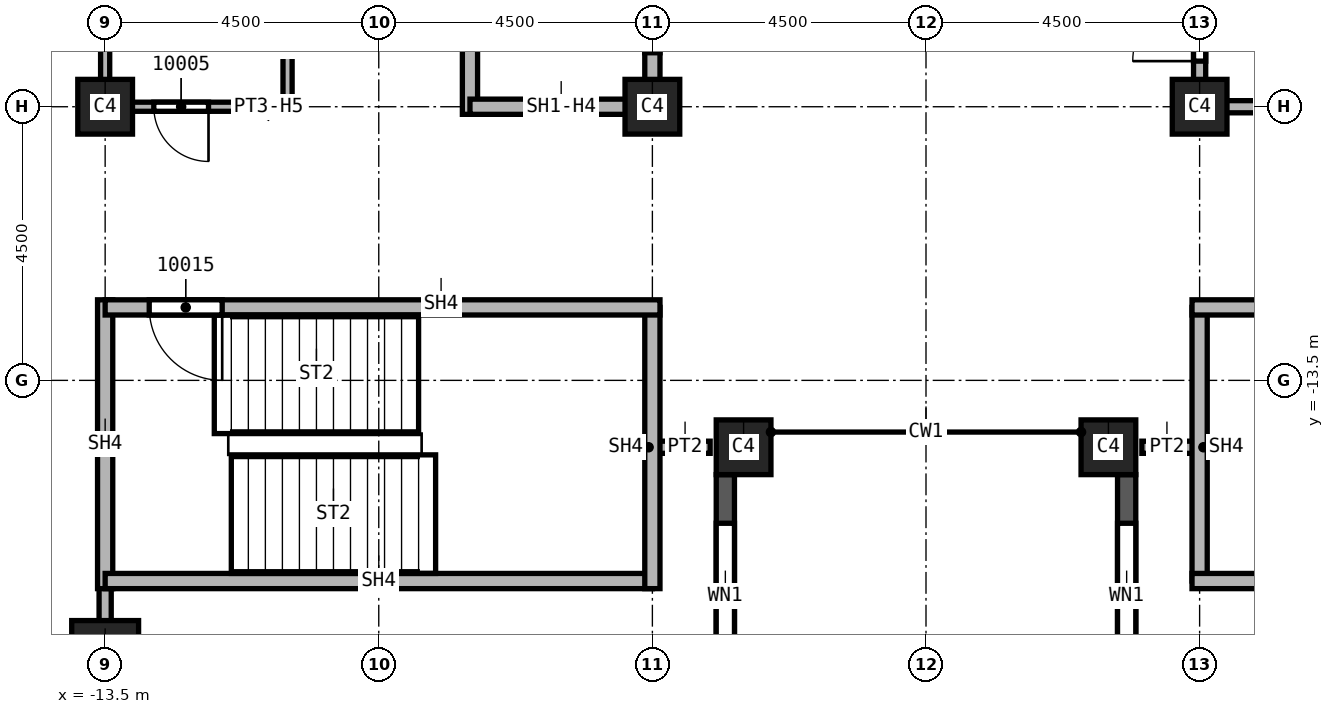
"""IFC4 building model, lengths in metres.
Left out: names, types, materials, properties, quantities, classifications, styles, units other than length and angle.
Written with IfcOpenShell. Run it as: python <this file> out.ifc"""

import sys

from ifc_helpers import new_model, si_unit, direction, frame, frame_2d, origin, origin_2d, place, context, subcontext, project, spatial, rectangle, extrude, element, fill, save


model = new_model("IFC4")
c1 = context("Model", 3, precision=1e-05, world=origin(), true_north=direction((0.0, 1.0)))
c2 = subcontext(c1, "Body", "Model", "MODEL_VIEW")
j1 = project(units=[si_unit("LENGTHUNIT", "METRE"), si_unit("PLANEANGLEUNIT", "RADIAN")], contexts=[c1])
p1 = place(None, origin())
s1 = spatial("IfcSite", under=j1, at=p1, CompositionType="ELEMENT")
p2 = place(p1, origin())
s2 = spatial("IfcBuilding", under=s1, at=p2, CompositionType="ELEMENT")
p3 = place(p2, frame((0.0, 0.0, 170.0)))
s3 = spatial("IfcBuildingStorey", under=s2, at=p3, CompositionType="ELEMENT", Elevation=170.0)
p4 = place(p3, frame((-13.5, -18.0, 0.0), z_axis=(0.0, 0.0, 1.0), x_axis=(1.0, 0.0, 0.0)))
e1 = element("IfcColumn", 1, at=p4, inside=s3, PredefinedType="COLUMN", context=c2, shape_type="SweptSolid", body=[
    extrude(rectangle(XDim=1.1, YDim=1.1, at=origin_2d()), origin(), (0.0, 0.0, 1.0), 3.7),
])
for number, where, z_axis, x_axis in (
    (2, (4.5, -9.0, 0.0), (0.0, 0.0, 1.0), (1.0, 0.0, 0.0)),
    (3, (-4.5, -9.0, 0.0), (0.0, 0.0, 1.0), (1.0, 0.0, 0.0)),
    (4, (-13.5, -9.0, 0.0), (0.0, 0.0, 1.0), (1.0, 0.0, 0.0)),
    (5, (3.0, -14.6, 0.0), (0.0, 0.0, 1.0), (1.0, 0.0, 0.0)),
    (6, (-3.0, -14.6, 0.0), (0.0, 0.0, 1.0), (1.0, 0.0, 0.0)),
):
    element("IfcColumn", number, at=place(p3, frame(where, z_axis=z_axis, x_axis=x_axis)), inside=s3, PredefinedType="COLUMN", context=c2, shape_type="SweptSolid", body=[
        extrude(rectangle(XDim=0.9, YDim=0.9, at=origin_2d()), origin(), (0.0, 0.0, 1.0), 3.7),
    ])
p5 = place(p3, frame((-3.3, -23.05, 0.0), z_axis=(0.0, 0.0, 1.0), x_axis=(0.0, 1.0, 0.0)))
e7 = element("IfcWall", 7, at=p5, inside=s3, PredefinedType="SOLIDWALL", context=c2, shape_type="SweptSolid", body=[
    extrude(rectangle(XDim=8.0, YDim=0.3, at=frame_2d((4.0, 0.0))), origin(), (0.0, 0.0, 1.0), 3.1),
])
p6 = place(p5, frame((0.8, 0.0, 0.8)))
e8 = element("IfcOpeningElement", 8, at=p6, cuts=e7, PredefinedType="OPENING", context=c2, shape_type="SweptSolid", body=[
    extrude(rectangle(XDim=2.4, YDim=1.95, at=frame_2d((1.2, 0.975))), frame((0.0, 0.15, 0.0), z_axis=(0.0, -1.0, 0.0), x_axis=(1.0, 0.0, 0.0)), (0.0, 0.0, 1.0), 0.3),
])
p7 = place(p5, frame((4.8, 0.0, 0.8)))
e9 = element("IfcOpeningElement", 9, at=p7, cuts=e7, PredefinedType="OPENING", context=c2, shape_type="SweptSolid", body=[
    extrude(rectangle(XDim=2.4, YDim=1.95, at=frame_2d((1.2, 0.975))), frame((0.0, 0.15, 0.0), z_axis=(0.0, -1.0, 0.0), x_axis=(1.0, 0.0, 0.0)), (0.0, 0.0, 1.0), 0.3),
])
p8 = place(p3, frame((3.3, -15.05, 0.0), z_axis=(0.0, 0.0, 1.0), x_axis=(0.0, -1.0, 0.0)))
e10 = element("IfcWall", 10, at=p8, inside=s3, PredefinedType="SOLIDWALL", context=c2, shape_type="SweptSolid", body=[
    extrude(rectangle(XDim=8.0, YDim=0.3, at=frame_2d((4.0, 0.0))), origin(), (0.0, 0.0, 1.0), 3.1),
])
p9 = place(p8, frame((0.8, 0.0, 0.8)))
e11 = element("IfcOpeningElement", 11, at=p9, cuts=e10, PredefinedType="OPENING", context=c2, shape_type="SweptSolid", body=[
    extrude(rectangle(XDim=2.4, YDim=1.95, at=frame_2d((1.2, 0.975))), frame((0.0, 0.15, 0.0), z_axis=(0.0, -1.0, 0.0), x_axis=(1.0, 0.0, 0.0)), (0.0, 0.0, 1.0), 0.3),
])
p10 = place(p8, frame((4.8, 0.0, 0.8)))
e12 = element("IfcOpeningElement", 12, at=p10, cuts=e10, PredefinedType="OPENING", context=c2, shape_type="SweptSolid", body=[
    extrude(rectangle(XDim=2.4, YDim=1.95, at=frame_2d((1.2, 0.975))), frame((0.0, 0.15, 0.0), z_axis=(0.0, -1.0, 0.0), x_axis=(1.0, 0.0, 0.0)), (0.0, 0.0, 1.0), 0.3),
])
p11 = place(p3, frame((-13.5, -16.675, 0.0), z_axis=(0.0, 0.0, 1.0), x_axis=(0.0, -1.0, 0.0)))
e13 = element("IfcWall", 13, at=p11, inside=s3, PredefinedType="PARTITIONING", context=c2, shape_type="SweptSolid", body=[
    extrude(rectangle(XDim=6.375, YDim=0.2, at=frame_2d((3.188, 0.0))), origin(), (0.0, 0.0, 1.0), 3.7),
])
p12 = place(p11, frame((2.65, 0.0, 0.0)))
e14 = element("IfcOpeningElement", 14, at=p12, cuts=e13, PredefinedType="OPENING", context=c2, shape_type="SweptSolid", body=[
    extrude(rectangle(XDim=1.0, YDim=2.1, at=frame_2d((0.5, 1.05))), frame((0.0, 0.1, 0.0), z_axis=(0.0, -1.0, 0.0), x_axis=(1.0, 0.0, 0.0)), (0.0, 0.0, 1.0), 0.2),
])
for number, where, z_axis, x_axis in (
    (15, (-3.55, -14.6, 0.0), (0.0, 0.0, 1.0), (-1.0, 0.0, 0.0)),
    (16, (4.5, -14.6, 0.0), (0.0, 0.0, 1.0), (-1.0, 0.0, 0.0)),
):
    element("IfcWall", number, at=place(p3, frame(where, z_axis=z_axis, x_axis=x_axis)), inside=s3, PredefinedType="PARTITIONING", context=c2, shape_type="SweptSolid", body=[
        extrude(rectangle(XDim=0.95, YDim=0.2, at=frame_2d((0.475, 0.0))), origin(), (0.0, 0.0, 1.0), 3.7),
    ])
p13 = place(p3, frame((4.5, -9.1, 0.0), z_axis=(0.0, 0.0, 1.0), x_axis=(0.0, 1.0, 0.0)))
e17 = element("IfcWall", 17, at=p13, inside=s3, PredefinedType="SOLIDWALL", context=c2, shape_type="SweptSolid", body=[
    extrude(rectangle(XDim=9.1, YDim=0.2, at=frame_2d((4.55, 0.0))), origin(), (0.0, 0.0, 1.0), 2.938),
])
p14 = place(p13, frame((0.85, 0.0, 0.0)))
e18 = element("IfcOpeningElement", 18, at=p14, cuts=e17, PredefinedType="OPENING", context=c2, shape_type="SweptSolid", body=[
    extrude(rectangle(XDim=1.1, YDim=2.1, at=frame_2d((0.55, 1.05))), frame((0.0, 0.1, 0.0), z_axis=(0.0, -1.0, 0.0), x_axis=(1.0, 0.0, 0.0)), (0.0, 0.0, 1.0), 0.2),
])
p15 = place(p13, frame((6.35, 0.0, 0.0)))
e19 = element("IfcOpeningElement", 19, at=p15, cuts=e17, PredefinedType="OPENING", context=c2, shape_type="SweptSolid", body=[
    extrude(rectangle(XDim=1.1, YDim=2.1, at=frame_2d((0.55, 1.05))), frame((0.0, 0.1, 0.0), z_axis=(0.0, -1.0, 0.0), x_axis=(1.0, 0.0, 0.0)), (0.0, 0.0, 1.0), 0.2),
])
p16 = place(p3, frame((7.5, -9.0, 0.0), z_axis=(0.0, 0.0, 1.0), x_axis=(-1.0, 0.0, 0.0)))
e20 = element("IfcWall", 20, at=p16, inside=s3, PredefinedType="SOLIDWALL", context=c2, shape_type="SweptSolid", body=[
    extrude(rectangle(XDim=3.0, YDim=0.2, at=frame_2d((1.5, 0.0))), origin(), (0.0, 0.0, 1.0), 2.938),
])
p17 = place(p3, frame((-7.5, -9.125, 0.0), z_axis=(0.0, 0.0, 1.0), x_axis=(0.0, 1.0, 0.0)))
e21 = element("IfcWall", 21, at=p17, inside=s3, PredefinedType="SOLIDWALL", context=c2, shape_type="SweptSolid", body=[
    extrude(rectangle(XDim=12.25, YDim=0.25, at=frame_2d((6.125, 0.0))), origin(), (0.0, 0.0, 1.0), 3.7),
])
p18 = place(p3, frame((-4.5, -9.0, 0.0), z_axis=(0.0, 0.0, 1.0), x_axis=(-1.0, 0.0, 0.0)))
e22 = element("IfcWall", 22, at=p18, inside=s3, PredefinedType="SOLIDWALL", context=c2, shape_type="SweptSolid", body=[
    extrude(rectangle(XDim=3.0, YDim=0.25, at=frame_2d((1.5, 0.0))), origin(), (0.0, 0.0, 1.0), 2.938),
])
p19 = place(p3, frame((-4.5, 0.0, 0.0), z_axis=(0.0, 0.0, 1.0), x_axis=(0.0, -1.0, 0.0)))
e23 = element("IfcWall", 23, at=p19, inside=s3, PredefinedType="SOLIDWALL", context=c2, shape_type="SweptSolid", body=[
    extrude(rectangle(XDim=9.125, YDim=0.25, at=frame_2d((4.562, 0.0))), origin(), (0.0, 0.0, 1.0), 2.938),
])
p20 = place(p19, frame((7.012, 0.0, 0.0)))
e24 = element("IfcOpeningElement", 24, at=p20, cuts=e23, PredefinedType="OPENING", context=c2, shape_type="SweptSolid", body=[
    extrude(rectangle(XDim=1.1, YDim=2.1, at=frame_2d((0.55, 1.05))), frame((0.0, 0.125, 0.0), z_axis=(0.0, -1.0, 0.0), x_axis=(1.0, 0.0, 0.0)), (0.0, 0.0, 1.0), 0.25),
])
p21 = place(p19, frame((3.95, 0.0, 0.0)))
e25 = element("IfcOpeningElement", 25, at=p21, cuts=e23, PredefinedType="OPENING", context=c2, shape_type="SweptSolid", body=[
    extrude(rectangle(XDim=1.1, YDim=2.1, at=frame_2d((0.55, 1.05))), frame((0.0, 0.125, 0.0), z_axis=(0.0, -1.0, 0.0), x_axis=(1.0, 0.0, 0.0)), (0.0, 0.0, 1.0), 0.25),
])
p22 = place(p19, frame((0.95, 0.0, 0.0)))
e26 = element("IfcOpeningElement", 26, at=p22, cuts=e23, PredefinedType="OPENING", context=c2, shape_type="SweptSolid", body=[
    extrude(rectangle(XDim=1.1, YDim=2.1, at=frame_2d((0.55, 1.05))), frame((0.0, 0.125, 0.0), z_axis=(0.0, -1.0, 0.0), x_axis=(1.0, 0.0, 0.0)), (0.0, 0.0, 1.0), 0.25),
])
p23 = place(p3, frame((-13.5, -12.175, 0.0), z_axis=(0.0, 0.0, 1.0), x_axis=(0.0, -1.0, 0.0)))
e27 = element("IfcWall", 27, at=p23, inside=s3, PredefinedType="SOLIDWALL", context=c2, shape_type="SweptSolid", body=[
    extrude(rectangle(XDim=4.75, YDim=0.25, at=frame_2d((2.375, 0.0))), origin(), (0.0, 0.0, 1.0), 3.7),
])
p24 = place(p3, frame((-4.5, -16.8, 0.0), z_axis=(0.0, 0.0, 1.0), x_axis=(-1.0, 0.0, 0.0)))
e28 = element("IfcWall", 28, at=p24, inside=s3, PredefinedType="SOLIDWALL", context=c2, shape_type="SweptSolid", body=[
    extrude(rectangle(XDim=9.0, YDim=0.25, at=frame_2d((4.5, 0.0))), origin(), (0.0, 0.0, 1.0), 3.7),
])
p25 = place(p3, frame((-4.5, -12.3, 0.0), z_axis=(0.0, 0.0, 1.0), x_axis=(0.0, -1.0, 0.0)))
e29 = element("IfcWall", 29, at=p25, inside=s3, PredefinedType="SOLIDWALL", context=c2, shape_type="SweptSolid", body=[
    extrude(rectangle(XDim=4.625, YDim=0.25, at=frame_2d((2.312, 0.0))), origin(), (0.0, 0.0, 1.0), 3.7),
])
p26 = place(p3, frame((-4.375, -12.3, 0.0), z_axis=(0.0, 0.0, 1.0), x_axis=(-1.0, 0.0, 0.0)))
e30 = element("IfcWall", 30, at=p26, inside=s3, PredefinedType="SOLIDWALL", context=c2, shape_type="SweptSolid", body=[
    extrude(rectangle(XDim=9.125, YDim=0.25, at=frame_2d((4.562, 0.0))), origin(), (0.0, 0.0, 1.0), 3.7),
])
p27 = place(p26, frame((7.2, 0.0, 0.0)))
e31 = element("IfcOpeningElement", 31, at=p27, cuts=e30, PredefinedType="OPENING", context=c2, shape_type="SweptSolid", body=[
    extrude(rectangle(XDim=1.2, YDim=2.1, at=frame_2d((0.6, 1.05))), frame((0.0, 0.125, 0.0), z_axis=(0.0, -1.0, 0.0), x_axis=(1.0, 0.0, 0.0)), (0.0, 0.0, 1.0), 0.25),
])
p28 = place(p3, frame((4.5, -16.8, 0.0), z_axis=(0.0, 0.0, 1.0), x_axis=(0.0, 1.0, 0.0)))
e32 = element("IfcWall", 32, at=p28, inside=s3, PredefinedType="SOLIDWALL", context=c2, shape_type="SweptSolid", body=[
    extrude(rectangle(XDim=4.5, YDim=0.25, at=frame_2d((2.25, 0.0))), origin(), (0.0, 0.0, 1.0), 3.7),
])
p29 = place(p3, frame((13.5, -16.8, 0.0), z_axis=(0.0, 0.0, 1.0), x_axis=(-1.0, 0.0, 0.0)))
e33 = element("IfcWall", 33, at=p29, inside=s3, PredefinedType="SOLIDWALL", context=c2, shape_type="SweptSolid", body=[
    extrude(rectangle(XDim=9.125, YDim=0.25, at=frame_2d((4.562, 0.0))), origin(), (0.0, 0.0, 1.0), 3.7),
])
p30 = place(p3, frame((13.5, -12.3, 0.0), z_axis=(0.0, 0.0, 1.0), x_axis=(-1.0, 0.0, 0.0)))
e34 = element("IfcWall", 34, at=p30, inside=s3, PredefinedType="SOLIDWALL", context=c2, shape_type="SweptSolid", body=[
    extrude(rectangle(XDim=9.125, YDim=0.25, at=frame_2d((4.562, 0.0))), origin(), (0.0, 0.0, 1.0), 3.7),
])
p31 = place(p30, frame((0.6, 0.0, 0.0)))
e35 = element("IfcOpeningElement", 35, at=p31, cuts=e34, PredefinedType="OPENING", context=c2, shape_type="SweptSolid", body=[
    extrude(rectangle(XDim=1.2, YDim=2.1, at=frame_2d((0.6, 1.05))), frame((0.0, 0.125, 0.0), z_axis=(0.0, -1.0, 0.0), x_axis=(1.0, 0.0, 0.0)), (0.0, 0.0, 1.0), 0.25),
])
p32 = place(p3, frame((-13.5, -9.075, 0.0), z_axis=(0.0, 0.0, 1.0), x_axis=(0.0, 1.0, 0.0)))
e36 = element("IfcWall", 36, at=p32, inside=s3, PredefinedType="PARTITIONING", context=c2, shape_type="SweptSolid", body=[
    extrude(rectangle(XDim=2.075, YDim=0.15, at=frame_2d((1.038, 0.0))), origin(), (0.0, 0.0, 1.0), 2.938),
])
p33 = place(p3, frame((-10.5, -9.075, 0.0), z_axis=(0.0, 0.0, 1.0), x_axis=(0.0, 1.0, 0.0)))
e37 = element("IfcWall", 37, at=p33, inside=s3, PredefinedType="PARTITIONING", context=c2, shape_type="SweptSolid", body=[
    extrude(rectangle(XDim=2.15, YDim=0.15, at=frame_2d((1.075, 0.0))), origin(), (0.0, 0.0, 1.0), 3.7),
])
p34 = place(p3, frame((-10.5, -9.0, 0.0), z_axis=(0.0, 0.0, 1.0), x_axis=(-1.0, 0.0, 0.0)))
e38 = element("IfcWall", 38, at=p34, inside=s3, PredefinedType="PARTITIONING", context=c2, shape_type="SweptSolid", body=[
    extrude(rectangle(XDim=3.0, YDim=0.15, at=frame_2d((1.5, 0.0))), origin(), (0.0, 0.0, 1.0), 2.938),
])
p35 = place(p34, frame((1.3, 0.0, 0.0)))
e39 = element("IfcOpeningElement", 39, at=p35, cuts=e38, PredefinedType="OPENING", context=c2, shape_type="SweptSolid", body=[
    extrude(rectangle(XDim=0.9, YDim=2.1, at=frame_2d((0.45, 1.05))), frame((0.0, 0.075, 0.0), z_axis=(0.0, -1.0, 0.0), x_axis=(1.0, 0.0, 0.0)), (0.0, 0.0, 1.0), 0.15),
])
p36 = place(p7, origin())
e40 = element("IfcWindow", 40, at=p36, inside=s3, PartitioningType="SINGLE_PANEL", PredefinedType="WINDOW", context=c2, shape_type="SweptSolid", body=[
    extrude(rectangle(XDim=2.4, YDim=1.95, at=frame_2d((1.2, 0.975))), frame((0.0, 0.03, 0.0), z_axis=(0.0, -1.0, 0.0), x_axis=(1.0, 0.0, 0.0)), (0.0, 0.0, 1.0), 0.06),
])
fill(e9, e40)
p37 = place(p9, origin())
e41 = element("IfcWindow", 41, at=p37, inside=s3, PartitioningType="SINGLE_PANEL", PredefinedType="WINDOW", context=c2, shape_type="SweptSolid", body=[
    extrude(rectangle(XDim=2.4, YDim=1.95, at=frame_2d((1.2, 0.975))), frame((0.0, 0.03, 0.0), z_axis=(0.0, -1.0, 0.0), x_axis=(1.0, 0.0, 0.0)), (0.0, 0.0, 1.0), 0.06),
])
fill(e11, e41)
p38 = place(p35, origin())
e42 = element("IfcDoor", 42, at=p38, inside=s3, OperationType="SINGLE_SWING_RIGHT", PredefinedType="DOOR", context=c2, shape_type="SweptSolid", body=[
    extrude(rectangle(XDim=0.9, YDim=2.1, at=frame_2d((0.45, 1.05))), frame((0.0, 0.025, 0.0), z_axis=(0.0, -1.0, 0.0), x_axis=(1.0, 0.0, 0.0)), (0.0, 0.0, 1.0), 0.05),
])
fill(e39, e42)
p39 = place(p14, origin())
e43 = element("IfcDoor", 43, at=p39, inside=s3, OperationType="SINGLE_SWING_LEFT", PredefinedType="DOOR", context=c2, shape_type="SweptSolid", body=[
    extrude(rectangle(XDim=1.1, YDim=2.1, at=frame_2d((0.55, 1.05))), frame((0.0, 0.025, 0.0), z_axis=(0.0, -1.0, 0.0), x_axis=(1.0, 0.0, 0.0)), (0.0, 0.0, 1.0), 0.05),
])
fill(e18, e43)
p40 = place(p27, origin())
e44 = element("IfcDoor", 44, at=p40, inside=s3, OperationType="SINGLE_SWING_RIGHT", PredefinedType="DOOR", context=c2, shape_type="SweptSolid", body=[
    extrude(rectangle(XDim=1.2, YDim=2.1, at=frame_2d((0.6, 1.05))), frame((0.0, 0.025, 0.0), z_axis=(0.0, -1.0, 0.0), x_axis=(1.0, 0.0, 0.0)), (0.0, 0.0, 1.0), 0.05),
])
fill(e31, e44)
p41 = place(p20, origin())
e45 = element("IfcDoor", 45, at=p41, inside=s3, OperationType="SLIDING_TO_LEFT", PredefinedType="DOOR", context=c2, shape_type="SweptSolid", body=[
    extrude(rectangle(XDim=1.1, YDim=2.1, at=frame_2d((0.55, 1.05))), frame((0.0, 0.025, 0.0), z_axis=(0.0, -1.0, 0.0), x_axis=(1.0, 0.0, 0.0)), (0.0, 0.0, 1.0), 0.05),
])
fill(e24, e45)
save(model, sys.argv[1])
